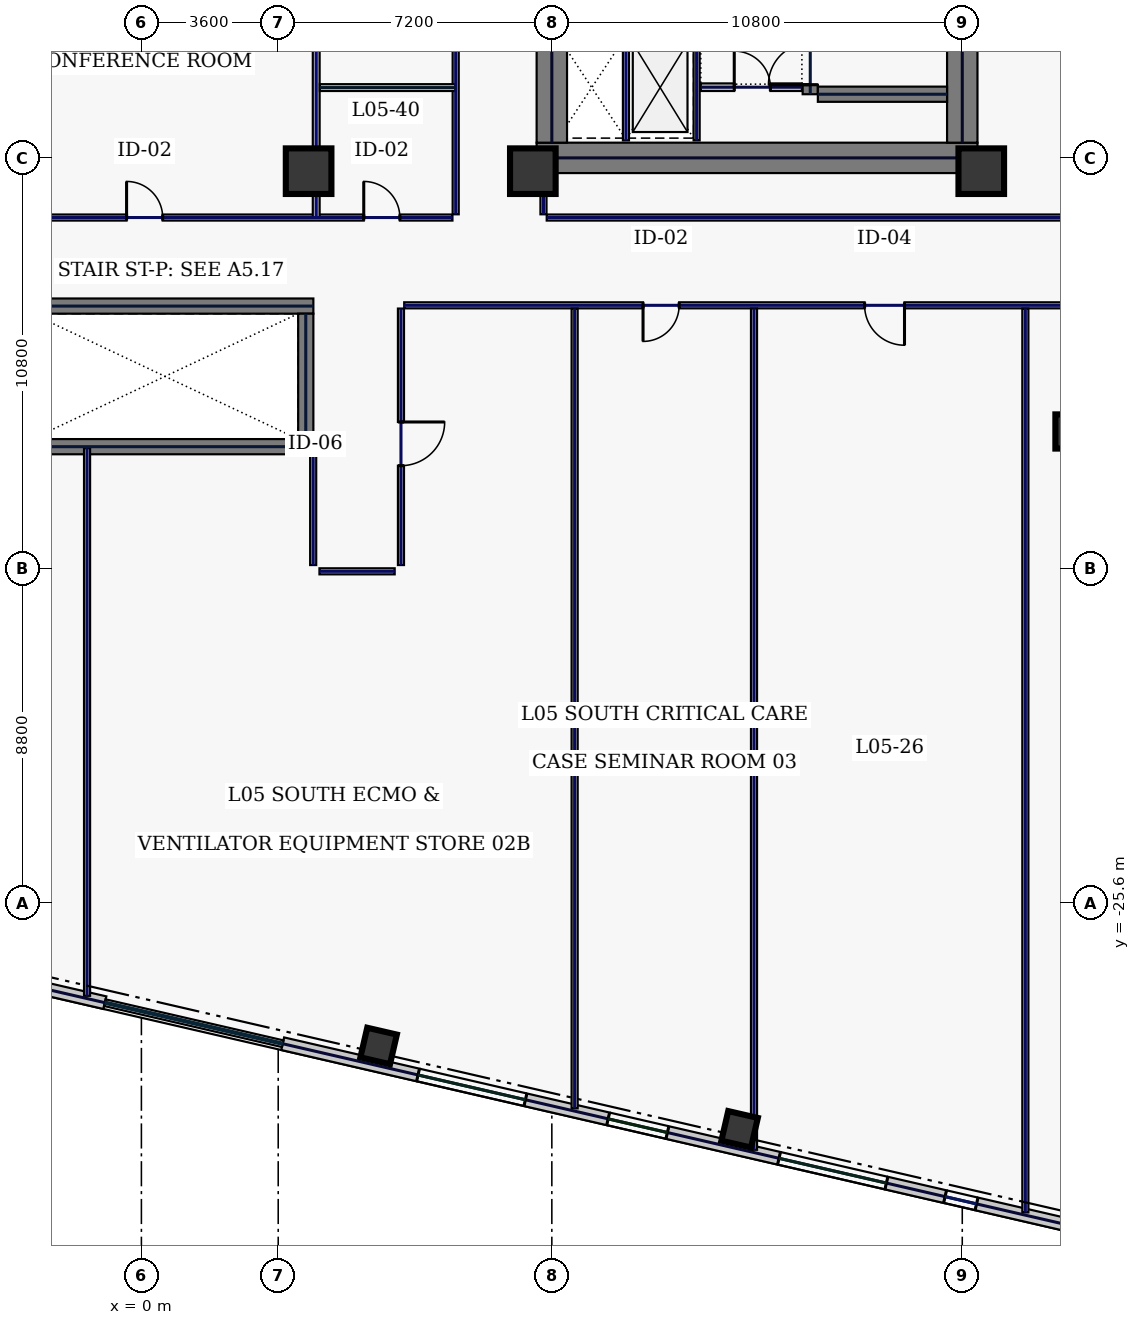
"""IFC4 building model, lengths in metres.
Left out: names, types, materials, properties, quantities, classifications, styles, units other than length and angle.
Written with IfcOpenShell. Run it as: python <this file> out.ifc"""

import sys

from ifc_helpers import new_model, si_unit, direction, frame, frame_2d, origin, origin_2d, place, context, subcontext, project, spatial, rectangle, hollow_rectangle, extrude, element, fill, save


model = new_model("IFC4")
c1 = context("Model", 3, precision=1e-05, world=origin(), true_north=direction((0.0, 1.0)))
c2 = subcontext(c1, "Body", "Model", "MODEL_VIEW")
j1 = project(units=[si_unit("LENGTHUNIT", "METRE"), si_unit("PLANEANGLEUNIT", "RADIAN")], contexts=[c1])
p1 = place(None, origin())
s1 = spatial("IfcSite", under=j1, at=p1, CompositionType="ELEMENT")
p2 = place(p1, origin())
s2 = spatial("IfcBuilding", under=s1, at=p2, CompositionType="ELEMENT")
p3 = place(p2, frame((0.0, 0.0, 28.4)))
s3 = spatial("IfcBuildingStorey", under=s2, at=p3, CompositionType="ELEMENT", Elevation=28.4)
p4 = place(p3, frame((10.4, -6.0, 0.0), z_axis=(0.0, 0.0, 1.0), x_axis=(1.0, 0.0, 0.0)))
e1 = element("IfcWall", 1, at=p4, inside=s3, PredefinedType="SHEAR", context=c2, shape_type="SweptSolid", body=[
    extrude(rectangle(XDim=11.6, YDim=0.8, at=frame_2d((5.8, 0.0))), origin(), (0.0, 0.0, 1.0), 4.68),
])
p5 = place(p3, frame((21.6, -5.6, 0.0), z_axis=(0.0, 0.0, 1.0), x_axis=(0.0, 1.0, 0.0)))
e2 = element("IfcWall", 2, at=p5, inside=s3, PredefinedType="SHEAR", context=c2, shape_type="SweptSolid", body=[
    extrude(rectangle(XDim=11.2, YDim=0.8, at=frame_2d((5.6, 0.0))), origin(), (0.0, 0.0, 1.0), 4.68),
])
p6 = place(p3, frame((10.8, -5.6, 0.0), z_axis=(0.0, 0.0, 1.0), x_axis=(0.0, 1.0, 0.0)))
e3 = element("IfcWall", 3, at=p6, inside=s3, PredefinedType="SHEAR", context=c2, shape_type="SweptSolid", body=[
    extrude(rectangle(XDim=2.95, YDim=0.8, at=frame_2d((1.475, 0.0))), origin(), (0.0, 0.0, 1.0), 4.68),
])
p7 = place(p3, frame((17.6, -4.325, 0.0), z_axis=(0.0, 0.0, 1.0), x_axis=(0.0, 1.0, 0.0)))
e4 = element("IfcWall", 4, at=p7, inside=s3, PredefinedType="SHEAR", context=c2, shape_type="SweptSolid", body=[
    extrude(rectangle(XDim=8.65, YDim=0.4, at=frame_2d((4.325, 0.0))), origin(), (0.0, 0.0, 1.0), 4.68),
])
p8 = place(p7, frame((0.25, 0.0, 0.0)))
e5 = element("IfcOpeningElement", 5, at=p8, cuts=e4, PredefinedType="OPENING", context=c2, shape_type="SweptSolid", body=[
    extrude(rectangle(XDim=1.1, YDim=2.2, at=frame_2d((0.55, 1.1))), frame((0.0, 0.21, 0.0), z_axis=(0.0, -1.0, 0.0), x_axis=(1.0, 0.0, 0.0)), (0.0, 0.0, 1.0), 0.42),
])
p9 = place(p3, frame((17.8, -4.325, 0.0), z_axis=(0.0, 0.0, 1.0), x_axis=(1.0, 0.0, 0.0)))
e6 = element("IfcWall", 6, at=p9, inside=s3, PredefinedType="SHEAR", context=c2, shape_type="SweptSolid", body=[
    extrude(rectangle(XDim=3.4, YDim=0.4, at=frame_2d((1.7, 0.0))), origin(), (0.0, 0.0, 1.0), 4.68),
])
p10 = place(p3, frame((-4.525, -13.6, 0.0), z_axis=(0.0, 0.0, 1.0), x_axis=(1.0, 0.0, 0.0)))
e7 = element("IfcWall", 7, at=p10, inside=s3, PredefinedType="SHEAR", context=c2, shape_type="SweptSolid", body=[
    extrude(rectangle(XDim=9.05, YDim=0.4, at=frame_2d((4.525, 0.0))), origin(), (0.0, 0.0, 1.0), 4.68),
])
p11 = place(p3, frame((-4.525, -9.9, 0.0), z_axis=(0.0, 0.0, 1.0), x_axis=(1.0, 0.0, 0.0)))
e8 = element("IfcWall", 8, at=p11, inside=s3, PredefinedType="SHEAR", context=c2, shape_type="SweptSolid", body=[
    extrude(rectangle(XDim=9.05, YDim=0.4, at=frame_2d((4.525, 0.0))), origin(), (0.0, 0.0, 1.0), 4.68),
])
p12 = place(p11, frame((0.25, 0.0, 0.0)))
e9 = element("IfcOpeningElement", 9, at=p12, cuts=e8, PredefinedType="OPENING", context=c2, shape_type="SweptSolid", body=[
    extrude(rectangle(XDim=1.1, YDim=2.2, at=frame_2d((0.55, 1.1))), frame((0.0, 0.21, 0.0), z_axis=(0.0, -1.0, 0.0), x_axis=(1.0, 0.0, 0.0)), (0.0, 0.0, 1.0), 0.42),
])
p13 = place(p3, frame((4.325, -13.4, 0.0), z_axis=(0.0, 0.0, 1.0), x_axis=(0.0, 1.0, 0.0)))
e10 = element("IfcWall", 10, at=p13, inside=s3, PredefinedType="SHEAR", context=c2, shape_type="SweptSolid", body=[
    extrude(rectangle(XDim=3.3, YDim=0.4, at=frame_2d((1.65, 0.0))), origin(), (0.0, 0.0, 1.0), 4.68),
])
for number, where, z_axis, x_axis in (
    (11, (10.3, -6.35, 0.0), (0.0, 0.0, 1.0), (1.0, 0.0, 0.0)),
    (12, (22.1, -6.35, 0.0), (0.0, 0.0, 1.0), (1.0, 0.0, 0.0)),
    (13, (4.4, -6.35, 0.0), (0.0, 0.0, 1.0), (1.0, 0.0, 0.0)),
):
    element("IfcColumn", number, at=place(p3, frame(where, z_axis=z_axis, x_axis=x_axis)), inside=s3, PredefinedType="COLUMN", context=c2, shape_type="SweptSolid", body=[
        extrude(hollow_rectangle(XDim=1.2, YDim=1.2, WallThickness=0.05, at=origin_2d()), origin(), (0.0, 0.0, 1.0), 4.68),
    ])
p14 = place(p3, frame((24.5, -13.2, 0.0), z_axis=(0.0, 0.0, 1.0), x_axis=(1.0, 0.0, 0.0)))
e14 = element("IfcColumn", 14, at=p14, inside=s3, PredefinedType="COLUMN", context=c2, shape_type="SweptSolid", body=[
    extrude(hollow_rectangle(XDim=0.9, YDim=0.9, WallThickness=0.04, at=origin_2d()), origin(), (0.0, 0.0, 1.0), 4.68),
])
for number, where, z_axis, x_axis in (
    (15, (6.242, -29.371, 0.0), (0.0, 0.0, 1.0), (0.974, -0.225, 0.0)),
    (16, (15.741, -31.564, 0.0), (0.0, 0.0, 1.0), (0.974, -0.225, 0.0)),
):
    element("IfcColumn", number, at=place(p3, frame(where, z_axis=z_axis, x_axis=x_axis)), inside=s3, PredefinedType="COLUMN", context=c2, shape_type="SweptSolid", body=[
        extrude(hollow_rectangle(XDim=0.8, YDim=0.8, WallThickness=0.036, at=origin_2d()), origin(), (0.0, 0.0, 1.0), 4.68),
    ])
p15 = place(p3, frame((-15.281, -24.925, 0.0), z_axis=(0.0, 0.0, 1.0), x_axis=(0.974370193991, -0.22495049469, 0.0)))
e17 = element("IfcWall", 17, at=p15, inside=s3, PredefinedType="STANDARD", context=c2, shape_type="SweptSolid", body=[
    extrude(rectangle(XDim=14.697, YDim=0.34, at=frame_2d((7.349, 0.0))), origin(), (0.0, 0.0, 1.0), 4.68),
])
p16 = place(p15, frame((3.656, 0.0, 0.85)))
e18 = element("IfcOpeningElement", 18, at=p16, cuts=e17, PredefinedType="OPENING", context=c2, shape_type="SweptSolid", body=[
    extrude(rectangle(XDim=2.9, YDim=2.3, at=frame_2d((1.45, 1.15))), frame((0.0, 0.18, 0.0), z_axis=(0.0, -1.0, 0.0), x_axis=(1.0, 0.0, 0.0)), (0.0, 0.0, 1.0), 0.36),
])
p17 = place(p15, frame((8.141, 0.0, 0.85)))
e19 = element("IfcOpeningElement", 19, at=p17, cuts=e17, PredefinedType="OPENING", context=c2, shape_type="SweptSolid", body=[
    extrude(rectangle(XDim=2.9, YDim=2.3, at=frame_2d((1.45, 1.15))), frame((0.0, 0.18, 0.0), z_axis=(0.0, -1.0, 0.0), x_axis=(1.0, 0.0, 0.0)), (0.0, 0.0, 1.0), 0.36),
])
p18 = place(p3, frame((3.717, -29.311, 0.0), z_axis=(0.0, 0.0, 1.0), x_axis=(0.97436993772, -0.224951604723, 0.0)))
e20 = element("IfcWall", 20, at=p18, inside=s3, PredefinedType="STANDARD", context=c2, shape_type="SweptSolid", body=[
    extrude(rectangle(XDim=22.651, YDim=0.34, at=frame_2d((11.326, 0.0))), origin(), (0.0, 0.0, 1.0), 4.68),
])
p19 = place(p18, frame((3.656, 0.0, 0.85)))
e21 = element("IfcOpeningElement", 21, at=p19, cuts=e20, PredefinedType="OPENING", context=c2, shape_type="SweptSolid", body=[
    extrude(rectangle(XDim=2.9, YDim=2.3, at=frame_2d((1.45, 1.15))), frame((0.0, 0.18, 0.0), z_axis=(0.0, -1.0, 0.0), x_axis=(1.0, 0.0, 0.0)), (0.0, 0.0, 1.0), 0.36),
])
p20 = place(p18, frame((8.791, 0.0, 0.22)))
e22 = element("IfcOpeningElement", 22, at=p20, cuts=e20, PredefinedType="OPENING", context=c2, shape_type="SweptSolid", body=[
    extrude(rectangle(XDim=1.6, YDim=1.2, at=frame_2d((0.8, 0.6))), frame((0.0, 0.18, 0.0), z_axis=(0.0, -1.0, 0.0), x_axis=(1.0, 0.0, 0.0)), (0.0, 0.0, 1.0), 0.36),
])
p21 = place(p18, frame((13.405, 0.0, 0.85)))
e23 = element("IfcOpeningElement", 23, at=p21, cuts=e20, PredefinedType="OPENING", context=c2, shape_type="SweptSolid", body=[
    extrude(rectangle(XDim=2.9, YDim=2.3, at=frame_2d((1.45, 1.15))), frame((0.0, 0.18, 0.0), z_axis=(0.0, -1.0, 0.0), x_axis=(1.0, 0.0, 0.0)), (0.0, 0.0, 1.0), 0.36),
])
p22 = place(p18, frame((17.889, 0.0, 0.85)))
e24 = element("IfcOpeningElement", 24, at=p22, cuts=e20, PredefinedType="OPENING", context=c2, shape_type="SweptSolid", body=[
    extrude(rectangle(XDim=0.85, YDim=1.85, at=frame_2d((0.425, 0.925))), frame((0.0, 0.18, 0.0), z_axis=(0.0, -1.0, 0.0), x_axis=(1.0, 0.0, 0.0)), (0.0, 0.0, 1.0), 0.36),
])
for number, where, z_axis, x_axis in (
    (25, (12.75, -5.54, 0.0), (0.0, 0.0, 1.0), (0.0, 1.0, 0.0)),
    (26, (14.61, -5.54, 0.0), (0.0, 0.0, 1.0), (0.0, 1.0, 0.0)),
):
    element("IfcWall", number, at=place(p3, frame(where, z_axis=z_axis, x_axis=x_axis)), inside=s3, PredefinedType="PARTITIONING", context=c2, shape_type="SweptSolid", body=[
        extrude(rectangle(XDim=2.7, YDim=0.16, at=frame_2d((1.35, 0.0))), origin(), (0.0, 0.0, 1.0), 4.68),
    ])
p23 = place(p3, frame((14.72, -4.14, 0.0), z_axis=(0.0, 0.0, 1.0), x_axis=(1.0, 0.0, 0.0)))
e27 = element("IfcWall", 27, at=p23, inside=s3, PredefinedType="SOLIDWALL", context=c2, shape_type="SweptSolid", body=[
    extrude(rectangle(XDim=2.66, YDim=0.2, at=frame_2d((1.33, 0.0))), origin(), (0.0, 0.0, 1.0), 4.68),
])
p24 = place(p23, frame((0.88, 0.0, 0.0)))
e28 = element("IfcOpeningElement", 28, at=p24, cuts=e27, PredefinedType="OPENING", context=c2, shape_type="SweptSolid", body=[
    extrude(rectangle(XDim=0.95, YDim=2.2, at=frame_2d((0.475, 1.1))), frame((0.0, 0.11, 0.0), z_axis=(0.0, -1.0, 0.0), x_axis=(1.0, 0.0, 0.0)), (0.0, 0.0, 1.0), 0.22),
])
p25 = place(p3, frame((29.415, -9.88, 0.0), z_axis=(0.0, 0.0, 1.0), x_axis=(-1.0, 0.0, 0.0)))
e29 = element("IfcWall", 29, at=p25, inside=s3, PredefinedType="PARTITIONING", context=c2, shape_type="SweptSolid", body=[
    extrude(rectangle(XDim=22.5, YDim=0.16, at=frame_2d((11.25, 0.0))), origin(), (0.0, 0.0, 1.0), 4.68),
])
p26 = place(p25, frame((15.265, 0.0, 0.0)))
e30 = element("IfcOpeningElement", 30, at=p26, cuts=e29, PredefinedType="OPENING", context=c2, shape_type="SweptSolid", body=[
    extrude(rectangle(XDim=0.95, YDim=2.2, at=frame_2d((0.475, 1.1))), frame((0.0, 0.09, 0.0), z_axis=(0.0, -1.0, 0.0), x_axis=(1.0, 0.0, 0.0)), (0.0, 0.0, 1.0), 0.18),
])
p27 = place(p25, frame((9.335, 0.0, 0.0)))
e31 = element("IfcOpeningElement", 31, at=p27, cuts=e29, PredefinedType="OPENING", context=c2, shape_type="SweptSolid", body=[
    extrude(rectangle(XDim=1.05, YDim=2.2, at=frame_2d((0.525, 1.1))), frame((0.0, 0.09, 0.0), z_axis=(0.0, -1.0, 0.0), x_axis=(1.0, 0.0, 0.0)), (0.0, 0.0, 1.0), 0.18),
])
p28 = place(p25, frame((2.839, 0.0, 0.0)))
e32 = element("IfcOpeningElement", 32, at=p28, cuts=e29, PredefinedType="OPENING", context=c2, shape_type="SweptSolid", body=[
    extrude(rectangle(XDim=0.95, YDim=2.2, at=frame_2d((0.475, 1.1))), frame((0.0, 0.09, 0.0), z_axis=(0.0, -1.0, 0.0), x_axis=(1.0, 0.0, 0.0)), (0.0, 0.0, 1.0), 0.18),
])
p29 = place(p3, frame((6.83, -9.965, 0.0), z_axis=(0.0, 0.0, 1.0), x_axis=(0.0, -1.0, 0.0)))
e33 = element("IfcWall", 33, at=p29, inside=s3, PredefinedType="PARTITIONING", context=c2, shape_type="SweptSolid", body=[
    extrude(rectangle(XDim=6.75, YDim=0.16, at=frame_2d((3.375, 0.0))), origin(), (0.0, 0.0, 1.0), 4.68),
])
p30 = place(p29, frame((2.985, 0.0, 0.0)))
e34 = element("IfcOpeningElement", 34, at=p30, cuts=e33, PredefinedType="OPENING", context=c2, shape_type="SweptSolid", body=[
    extrude(rectangle(XDim=1.15, YDim=2.2, at=frame_2d((0.575, 1.1))), frame((0.0, 0.09, 0.0), z_axis=(0.0, -1.0, 0.0), x_axis=(1.0, 0.0, 0.0)), (0.0, 0.0, 1.0), 0.18),
])
p31 = place(p3, frame((6.665, -16.88, 0.0), z_axis=(0.0, 0.0, 1.0), x_axis=(-1.0, 0.0, 0.0)))
e35 = element("IfcWall", 35, at=p31, inside=s3, PredefinedType="PARTITIONING", context=c2, shape_type="SweptSolid", body=[
    extrude(rectangle(XDim=1.98, YDim=0.16, at=frame_2d((0.99, 0.0))), origin(), (0.0, 0.0, 1.0), 4.68),
])
p32 = place(p3, frame((4.52, -16.715, 0.0), z_axis=(0.0, 0.0, 1.0), x_axis=(0.0, 1.0, 0.0)))
e36 = element("IfcWall", 36, at=p32, inside=s3, PredefinedType="PARTITIONING", context=c2, shape_type="SweptSolid", body=[
    extrude(rectangle(XDim=2.915, YDim=0.16, at=frame_2d((1.458, 0.0))), origin(), (0.0, 0.0, 1.0), 4.68),
])
p33 = place(p3, frame((10.58, -6.42, 0.0), z_axis=(0.0, 0.0, 1.0), x_axis=(0.0, -1.0, 0.0)))
e37 = element("IfcWall", 37, at=p33, inside=s3, PredefinedType="PARTITIONING", context=c2, shape_type="SweptSolid", body=[
    extrude(rectangle(XDim=1.065, YDim=0.16, at=frame_2d((0.533, 0.0))), origin(), (0.0, 0.0, 1.0), 4.68),
])
p34 = place(p3, frame((10.665, -7.57, 0.0), z_axis=(0.0, 0.0, 1.0), x_axis=(1.0, 0.0, 0.0)))
e38 = element("IfcWall", 38, at=p34, inside=s3, PredefinedType="PARTITIONING", context=c2, shape_type="SweptSolid", body=[
    extrude(rectangle(XDim=16.52, YDim=0.16, at=frame_2d((8.26, 0.0))), origin(), (0.0, 0.0, 1.0), 4.68),
])
p35 = place(p3, frame((-8.185, -7.57, 0.0), z_axis=(0.0, 0.0, 1.0), x_axis=(1.0, 0.0, 0.0)))
e39 = element("IfcWall", 39, at=p35, inside=s3, PredefinedType="PARTITIONING", context=c2, shape_type="SweptSolid", body=[
    extrude(rectangle(XDim=16.37, YDim=0.16, at=frame_2d((8.185, 0.0))), origin(), (0.0, 0.0, 1.0), 4.68),
])
p36 = place(p35, frame((7.795, 0.0, 0.0)))
e40 = element("IfcOpeningElement", 40, at=p36, cuts=e39, PredefinedType="OPENING", context=c2, shape_type="SweptSolid", body=[
    extrude(rectangle(XDim=0.95, YDim=2.2, at=frame_2d((0.475, 1.1))), frame((0.0, 0.09, 0.0), z_axis=(0.0, -1.0, 0.0), x_axis=(1.0, 0.0, 0.0)), (0.0, 0.0, 1.0), 0.18),
])
p37 = place(p35, frame((14.036, 0.0, 0.0)))
e41 = element("IfcOpeningElement", 41, at=p37, cuts=e39, PredefinedType="OPENING", context=c2, shape_type="SweptSolid", body=[
    extrude(rectangle(XDim=0.95, YDim=2.2, at=frame_2d((0.475, 1.1))), frame((0.0, 0.09, 0.0), z_axis=(0.0, -1.0, 0.0), x_axis=(1.0, 0.0, 0.0)), (0.0, 0.0, 1.0), 0.18),
])
p38 = place(p3, frame((8.27, -7.485, 0.0), z_axis=(0.0, 0.0, 1.0), x_axis=(0.0, 1.0, 0.0)))
e42 = element("IfcWall", 42, at=p38, inside=s3, PredefinedType="PARTITIONING", context=c2, shape_type="SweptSolid", body=[
    extrude(rectangle(XDim=14.97, YDim=0.16, at=frame_2d((7.485, 0.0))), origin(), (0.0, 0.0, 1.0), 4.68),
])
p39 = place(p38, frame((8.611, 0.0, 0.0)))
e43 = element("IfcOpeningElement", 43, at=p39, cuts=e42, PredefinedType="OPENING", context=c2, shape_type="SweptSolid", body=[
    extrude(rectangle(XDim=0.95, YDim=2.2, at=frame_2d((0.475, 1.1))), frame((0.0, 0.09, 0.0), z_axis=(0.0, -1.0, 0.0), x_axis=(1.0, 0.0, 0.0)), (0.0, 0.0, 1.0), 0.18),
])
p40 = place(p3, frame((11.4, -31.013, 0.0), z_axis=(0.0, 0.0, 1.0), x_axis=(0.0, 1.0, 0.0)))
e44 = element("IfcWall", 44, at=p40, inside=s3, PredefinedType="PARTITIONING", context=c2, shape_type="SweptSolid", body=[
    extrude(rectangle(XDim=21.048, YDim=0.16, at=frame_2d((10.524, 0.0))), origin(), (0.0, 0.0, 1.0), 4.68),
])
p41 = place(p3, frame((16.12, -32.103, 0.0), z_axis=(0.0, 0.0, 1.0), x_axis=(0.0, 1.0, 0.0)))
e45 = element("IfcWall", 45, at=p41, inside=s3, PredefinedType="PARTITIONING", context=c2, shape_type="SweptSolid", body=[
    extrude(rectangle(XDim=22.138, YDim=0.16, at=frame_2d((11.069, 0.0))), origin(), (0.0, 0.0, 1.0), 4.68),
])
p42 = place(p3, frame((-1.43, -28.051, 0.0), z_axis=(0.0, 0.0, 1.0), x_axis=(0.0, 1.0, 0.0)))
e46 = element("IfcWall", 46, at=p42, inside=s3, PredefinedType="PARTITIONING", context=c2, shape_type="SweptSolid", body=[
    extrude(rectangle(XDim=14.411, YDim=0.16, at=frame_2d((7.206, 0.0))), origin(), (0.0, 0.0, 1.0), 4.68),
])
p43 = place(p3, frame((23.26, -33.751, 0.0), z_axis=(0.0, 0.0, 1.0), x_axis=(0.0, 1.0, 0.0)))
e47 = element("IfcWall", 47, at=p43, inside=s3, PredefinedType="PARTITIONING", context=c2, shape_type="SweptSolid", body=[
    extrude(rectangle(XDim=23.786, YDim=0.16, at=frame_2d((11.893, 0.0))), origin(), (0.0, 0.0, 1.0), 4.68),
])
p44 = place(p3, frame((4.6, -7.565, 0.0), z_axis=(0.0, 0.0, 1.0), x_axis=(0.0, 1.0, 0.0)))
e48 = element("IfcWall", 48, at=p44, inside=s3, PredefinedType="PARTITIONING", context=c2, shape_type="SweptSolid", body=[
    extrude(rectangle(XDim=15.13, YDim=0.18, at=frame_2d((7.565, 0.0))), origin(), (0.0, 0.0, 1.0), 3.875),
])
p45 = place(p3, frame((4.695, -4.15, 0.0), z_axis=(0.0, 0.0, 1.0), x_axis=(1.0, 0.0, 0.0)))
e49 = element("IfcWall", 49, at=p45, inside=s3, PredefinedType="PARTITIONING", context=c2, shape_type="SweptSolid", body=[
    extrude(rectangle(XDim=3.57, YDim=0.18, at=frame_2d((1.785, 0.0))), origin(), (0.0, 0.0, 1.0), 4.68),
])
p46 = place(p19, origin())
e50 = element("IfcWindow", 50, at=p46, inside=s3, PartitioningType="SINGLE_PANEL", PredefinedType="WINDOW", context=c2, shape_type="SweptSolid", body=[
    extrude(rectangle(XDim=2.9, YDim=2.3, at=frame_2d((1.45, 1.15))), frame((0.0, 0.03, 0.0), z_axis=(0.0, -1.0, 0.0), x_axis=(1.0, 0.0, 0.0)), (0.0, 0.0, 1.0), 0.06),
])
fill(e21, e50)
p47 = place(p20, origin())
e51 = element("IfcWindow", 51, at=p47, inside=s3, PartitioningType="SINGLE_PANEL", PredefinedType="WINDOW", context=c2, shape_type="SweptSolid", body=[
    extrude(rectangle(XDim=1.6, YDim=1.2, at=frame_2d((0.8, 0.6))), frame((0.0, 0.03, 0.0), z_axis=(0.0, -1.0, 0.0), x_axis=(1.0, 0.0, 0.0)), (0.0, 0.0, 1.0), 0.06),
])
fill(e22, e51)
p48 = place(p21, origin())
e52 = element("IfcWindow", 52, at=p48, inside=s3, PartitioningType="SINGLE_PANEL", PredefinedType="WINDOW", context=c2, shape_type="SweptSolid", body=[
    extrude(rectangle(XDim=2.9, YDim=2.3, at=frame_2d((1.45, 1.15))), frame((0.0, 0.03, 0.0), z_axis=(0.0, -1.0, 0.0), x_axis=(1.0, 0.0, 0.0)), (0.0, 0.0, 1.0), 0.06),
])
fill(e23, e52)
p49 = place(p22, origin())
e53 = element("IfcWindow", 53, at=p49, inside=s3, PartitioningType="SINGLE_PANEL", PredefinedType="WINDOW", context=c2, shape_type="SweptSolid", body=[
    extrude(rectangle(XDim=0.85, YDim=1.85, at=frame_2d((0.425, 0.925))), frame((0.0, 0.03, 0.0), z_axis=(0.0, -1.0, 0.0), x_axis=(1.0, 0.0, 0.0)), (0.0, 0.0, 1.0), 0.06),
])
fill(e24, e53)
p50 = place(p8, origin())
e54 = element("IfcDoor", 54, at=p50, inside=s3, OperationType="SINGLE_SWING_LEFT", PredefinedType="DOOR", context=c2, shape_type="SweptSolid", body=[
    extrude(rectangle(XDim=1.1, YDim=2.2, at=frame_2d((0.55, 1.1))), frame((0.0, 0.025, 0.0), z_axis=(0.0, -1.0, 0.0), x_axis=(1.0, 0.0, 0.0)), (0.0, 0.0, 1.0), 0.05),
])
fill(e5, e54)
p51 = place(p24, origin())
e55 = element("IfcDoor", 55, at=p51, inside=s3, OperationType="SINGLE_SWING_LEFT", PredefinedType="DOOR", context=c2, shape_type="SweptSolid", body=[
    extrude(rectangle(XDim=0.95, YDim=2.2, at=frame_2d((0.475, 1.1))), frame((0.0, 0.025, 0.0), z_axis=(0.0, -1.0, 0.0), x_axis=(1.0, 0.0, 0.0)), (0.0, 0.0, 1.0), 0.05),
])
fill(e28, e55)
p52 = place(p30, origin())
e56 = element("IfcDoor", 56, at=p52, inside=s3, OperationType="SINGLE_SWING_LEFT", PredefinedType="DOOR", context=c2, shape_type="SweptSolid", body=[
    extrude(rectangle(XDim=1.15, YDim=2.2, at=frame_2d((0.575, 1.1))), frame((0.0, 0.025, 0.0), z_axis=(0.0, -1.0, 0.0), x_axis=(1.0, 0.0, 0.0)), (0.0, 0.0, 1.0), 0.05),
])
fill(e34, e56)
p53 = place(p26, origin())
e57 = element("IfcDoor", 57, at=p53, inside=s3, OperationType="SINGLE_SWING_RIGHT", PredefinedType="DOOR", context=c2, shape_type="SweptSolid", body=[
    extrude(rectangle(XDim=0.95, YDim=2.2, at=frame_2d((0.475, 1.1))), frame((0.0, 0.025, 0.0), z_axis=(0.0, -1.0, 0.0), x_axis=(1.0, 0.0, 0.0)), (0.0, 0.0, 1.0), 0.05),
])
fill(e30, e57)
p54 = place(p27, origin())
e58 = element("IfcDoor", 58, at=p54, inside=s3, OperationType="SINGLE_SWING_LEFT", PredefinedType="DOOR", context=c2, shape_type="SweptSolid", body=[
    extrude(rectangle(XDim=1.05, YDim=2.2, at=frame_2d((0.525, 1.1))), frame((0.0, 0.025, 0.0), z_axis=(0.0, -1.0, 0.0), x_axis=(1.0, 0.0, 0.0)), (0.0, 0.0, 1.0), 0.05),
])
fill(e31, e58)
p55 = place(p36, origin())
e59 = element("IfcDoor", 59, at=p55, inside=s3, OperationType="SINGLE_SWING_LEFT", PredefinedType="DOOR", context=c2, shape_type="SweptSolid", body=[
    extrude(rectangle(XDim=0.95, YDim=2.2, at=frame_2d((0.475, 1.1))), frame((0.0, 0.025, 0.0), z_axis=(0.0, -1.0, 0.0), x_axis=(1.0, 0.0, 0.0)), (0.0, 0.0, 1.0), 0.05),
])
fill(e40, e59)
p56 = place(p37, origin())
e60 = element("IfcDoor", 60, at=p56, inside=s3, OperationType="SINGLE_SWING_LEFT", PredefinedType="DOOR", context=c2, shape_type="SweptSolid", body=[
    extrude(rectangle(XDim=0.95, YDim=2.2, at=frame_2d((0.475, 1.1))), frame((0.0, 0.025, 0.0), z_axis=(0.0, -1.0, 0.0), x_axis=(1.0, 0.0, 0.0)), (0.0, 0.0, 1.0), 0.05),
])
fill(e41, e60)
save(model, sys.argv[1])
